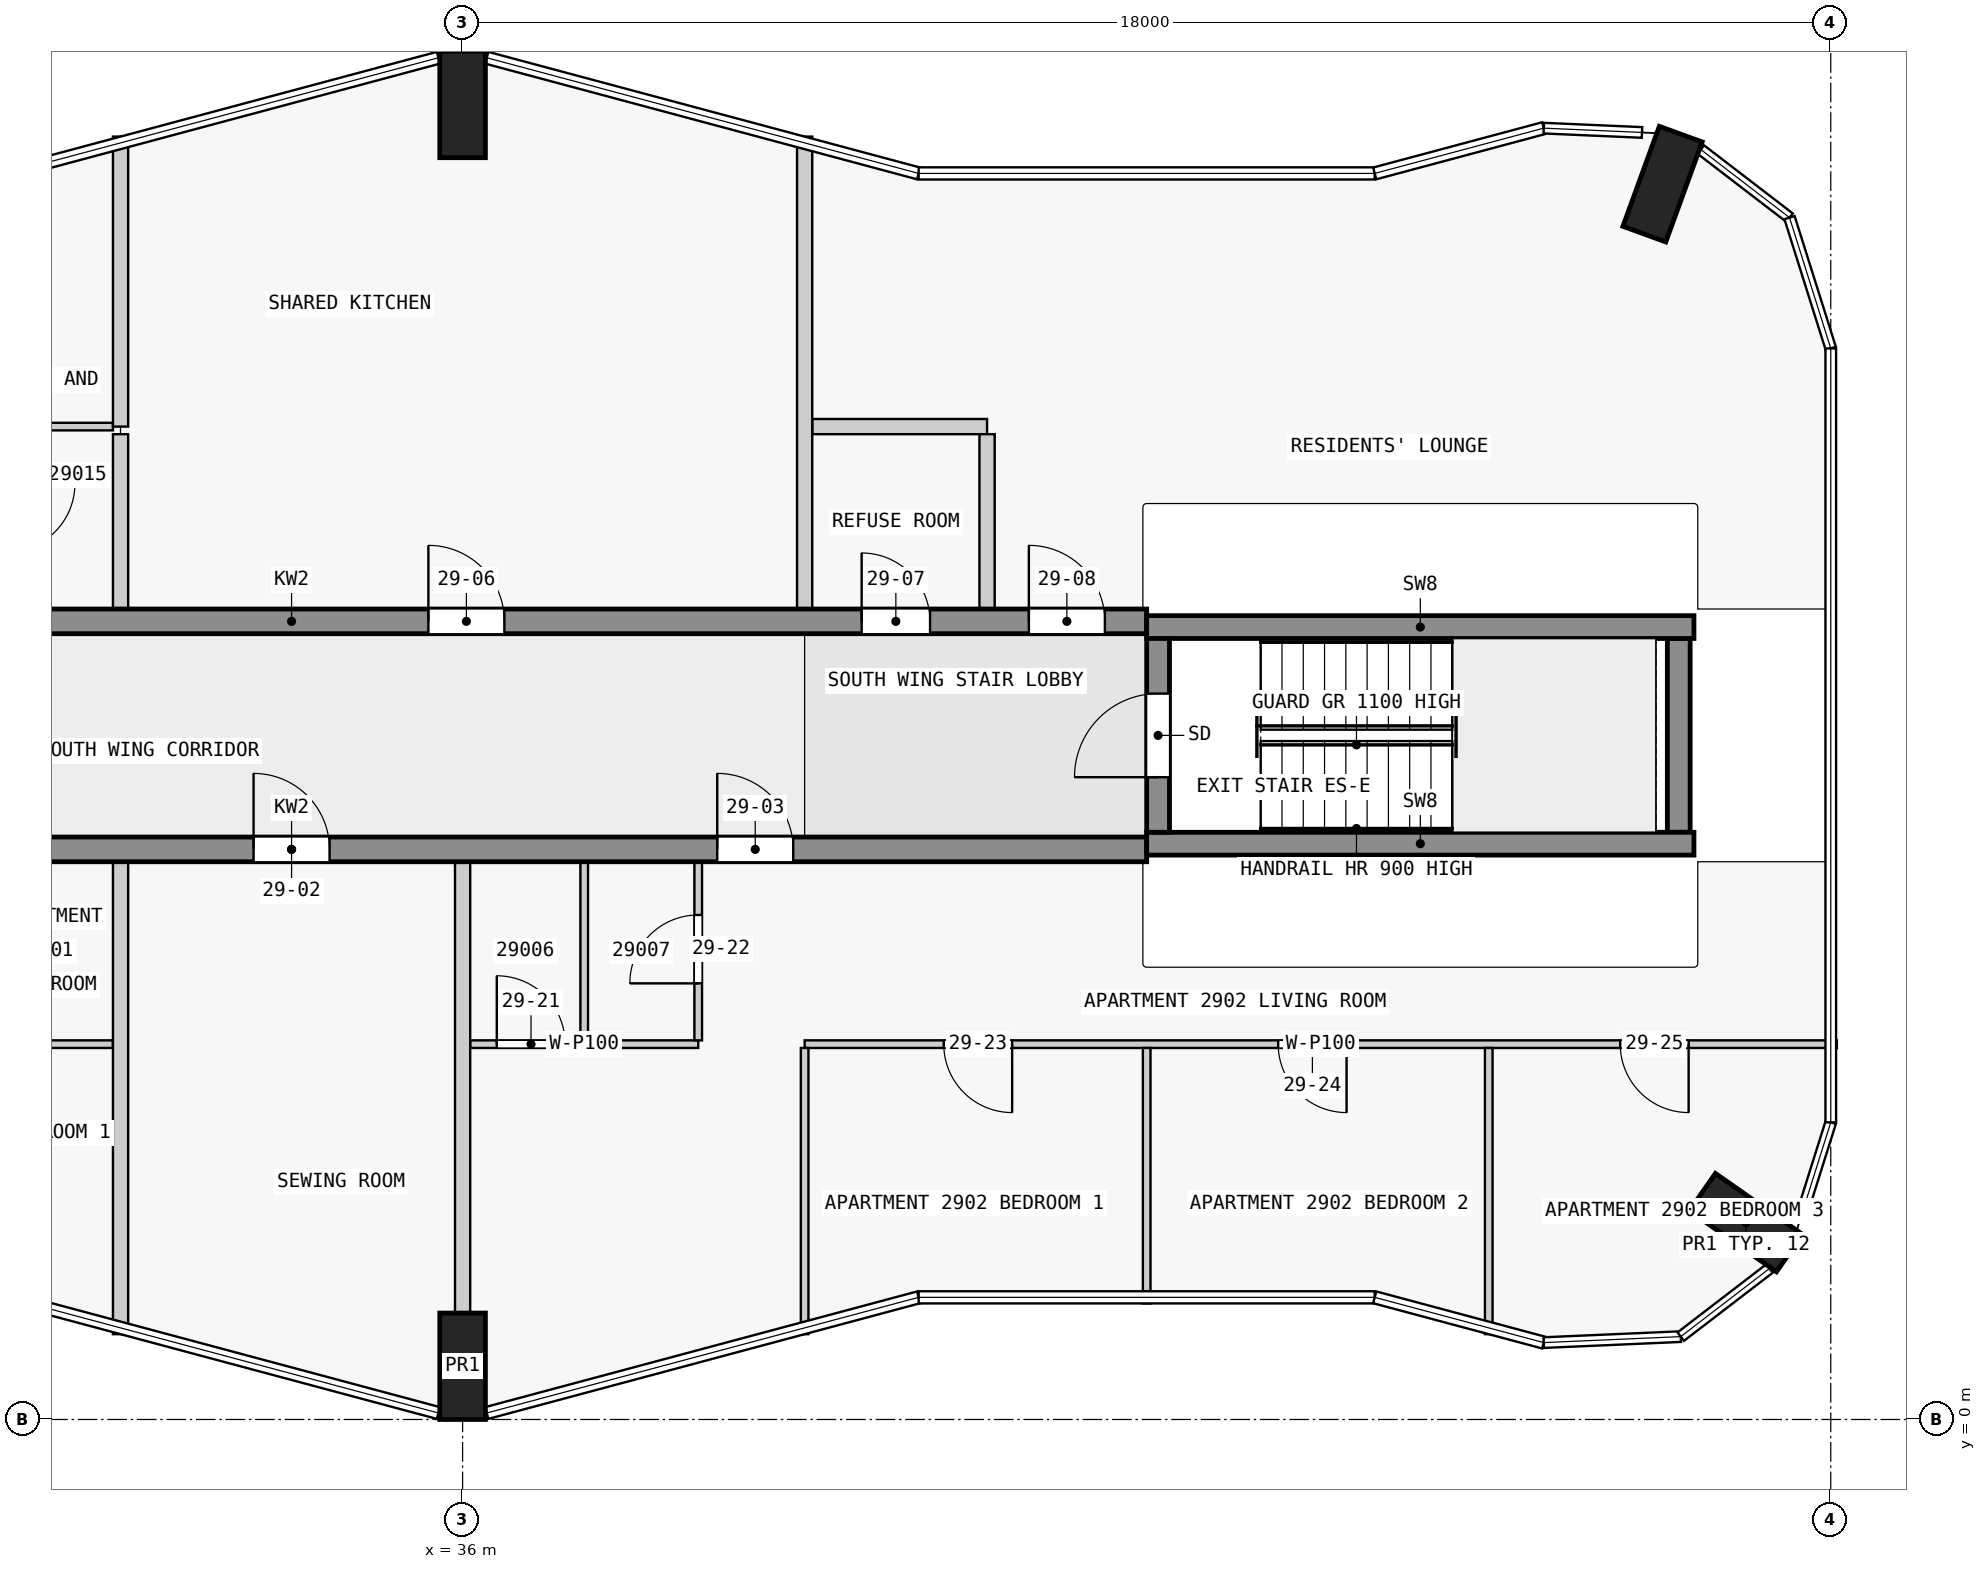
"""IFC4 building model, lengths in metres.
Left out: names, types, materials, properties, quantities, classifications, styles, units other than length and angle.
Written with IfcOpenShell. Run it as: python <this file> out.ifc"""

import sys

from ifc_helpers import new_model, si_unit, direction, frame, frame_2d, origin, origin_2d, place, context, subcontext, project, spatial, rectangle, extrude, element, fill, save


model = new_model("IFC4")
c1 = context("Model", 3, precision=1e-05, world=origin(), true_north=direction((0.0, 1.0)))
c2 = subcontext(c1, "Body", "Model", "MODEL_VIEW")
j1 = project(units=[si_unit("LENGTHUNIT", "METRE"), si_unit("PLANEANGLEUNIT", "RADIAN")], contexts=[c1])
p1 = place(None, origin())
s1 = spatial("IfcSite", under=j1, at=p1, CompositionType="ELEMENT")
p2 = place(p1, origin())
s2 = spatial("IfcBuilding", under=s1, at=p2, CompositionType="ELEMENT")
p3 = place(p2, frame((0.0, 0.0, 113.3)))
s3 = spatial("IfcBuildingStorey", under=s2, at=p3, CompositionType="ELEMENT", Elevation=113.3)
for number, where, z_axis, x_axis in (
    (1, (36.0, 0.7, 0.0), (0.0, 0.0, 1.0), (1.0, 0.0, 0.0)),
    (2, (52.884, 2.59, 0.0), (0.0, 0.0, 1.0), (0.574, 0.819, 0.0)),
    (3, (51.787, 16.252, 0.0), (0.0, 0.0, 1.0), (-0.94, 0.342, 0.0)),
    (4, (36.0, 17.3, 0.0), (0.0, 0.0, 1.0), (1.0, 0.0, 0.0)),
):
    element("IfcColumn", number, at=place(p3, frame(where, z_axis=z_axis, x_axis=x_axis)), inside=s3, PredefinedType="COLUMN", context=c2, shape_type="SweptSolid", body=[
        extrude(rectangle(XDim=0.6, YDim=1.4, at=origin_2d()), origin(), (0.0, 0.0, 1.0), 3.5),
    ])
p4 = place(p3, frame((45.15, 7.725, 0.0), z_axis=(0.0, 0.0, 1.0), x_axis=(0.0, 1.0, 0.0)))
e5 = element("IfcWall", 5, at=p4, inside=s3, PredefinedType="SHEAR", context=c2, shape_type="SweptSolid", body=[
    extrude(rectangle(XDim=2.55, YDim=0.3, at=frame_2d((1.275, 0.0))), origin(), (0.0, 0.0, 1.0), 3.5),
])
p5 = place(p4, frame((0.725, 0.0, 0.0)))
e6 = element("IfcOpeningElement", 6, at=p5, cuts=e5, PredefinedType="OPENING", context=c2, shape_type="SweptSolid", body=[
    extrude(rectangle(XDim=1.1, YDim=2.1, at=frame_2d((0.55, 1.05))), frame((0.0, 0.16, 0.0), z_axis=(0.0, -1.0, 0.0), x_axis=(1.0, 0.0, 0.0)), (0.0, 0.0, 1.0), 0.32),
])
p6 = place(p3, frame((52.0, 7.725, 0.0), z_axis=(0.0, 0.0, 1.0), x_axis=(0.0, 1.0, 0.0)))
e7 = element("IfcWall", 7, at=p6, inside=s3, PredefinedType="SHEAR", context=c2, shape_type="SweptSolid", body=[
    extrude(rectangle(XDim=2.55, YDim=0.3, at=frame_2d((1.275, 0.0))), origin(), (0.0, 0.0, 1.0), 3.5),
])
for number, where, z_axis, x_axis in (
    (8, (45.0, 7.575, 0.0), (0.0, 0.0, 1.0), (1.0, 0.0, 0.0)),
    (9, (45.0, 10.425, 0.0), (0.0, 0.0, 1.0), (1.0, 0.0, 0.0)),
):
    element("IfcWall", number, at=place(p3, frame(where, z_axis=z_axis, x_axis=x_axis)), inside=s3, PredefinedType="SHEAR", context=c2, shape_type="SweptSolid", body=[
        extrude(rectangle(XDim=7.2, YDim=0.3, at=frame_2d((3.6, 0.0))), origin(), (0.0, 0.0, 1.0), 3.5),
    ])
p7 = place(p3, frame((22.5, 7.5, 0.0), z_axis=(0.0, 0.0, 1.0), x_axis=(1.0, 0.0, 0.0)))
e10 = element("IfcWall", 10, at=p7, inside=s3, PredefinedType="SHEAR", context=c2, shape_type="SweptSolid", body=[
    extrude(rectangle(XDim=22.5, YDim=0.325, at=frame_2d((11.25, 0.0))), origin(), (0.0, 0.0, 1.0), 3.25),
])
p8 = place(p7, frame((4.05, 0.0, 0.0)))
e11 = element("IfcOpeningElement", 11, at=p8, cuts=e10, PredefinedType="OPENING", context=c2, shape_type="SweptSolid", body=[
    extrude(rectangle(XDim=1.0, YDim=2.1, at=frame_2d((0.5, 1.05))), frame((0.0, 0.172, 0.0), z_axis=(0.0, -1.0, 0.0), x_axis=(1.0, 0.0, 0.0)), (0.0, 0.0, 1.0), 0.345),
])
p9 = place(p7, frame((10.75, 0.0, 0.0)))
e12 = element("IfcOpeningElement", 12, at=p9, cuts=e10, PredefinedType="OPENING", context=c2, shape_type="SweptSolid", body=[
    extrude(rectangle(XDim=1.0, YDim=2.1, at=frame_2d((0.5, 1.05))), frame((0.0, 0.172, 0.0), z_axis=(0.0, -1.0, 0.0), x_axis=(1.0, 0.0, 0.0)), (0.0, 0.0, 1.0), 0.345),
])
p10 = place(p7, frame((16.85, 0.0, 0.0)))
e13 = element("IfcOpeningElement", 13, at=p10, cuts=e10, PredefinedType="OPENING", context=c2, shape_type="SweptSolid", body=[
    extrude(rectangle(XDim=1.0, YDim=2.1, at=frame_2d((0.5, 1.05))), frame((0.0, 0.172, 0.0), z_axis=(0.0, -1.0, 0.0), x_axis=(1.0, 0.0, 0.0)), (0.0, 0.0, 1.0), 0.345),
])
p11 = place(p3, frame((22.5, 10.5, 0.0), z_axis=(0.0, 0.0, 1.0), x_axis=(1.0, 0.0, 0.0)))
e14 = element("IfcWall", 14, at=p11, inside=s3, PredefinedType="SHEAR", context=c2, shape_type="SweptSolid", body=[
    extrude(rectangle(XDim=22.5, YDim=0.325, at=frame_2d((11.25, 0.0))), origin(), (0.0, 0.0, 1.0), 3.25),
])
p12 = place(p11, frame((1.85, 0.0, 0.0)))
e15 = element("IfcOpeningElement", 15, at=p12, cuts=e14, PredefinedType="OPENING", context=c2, shape_type="SweptSolid", body=[
    extrude(rectangle(XDim=0.9, YDim=2.1, at=frame_2d((0.45, 1.05))), frame((0.0, 0.172, 0.0), z_axis=(0.0, -1.0, 0.0), x_axis=(1.0, 0.0, 0.0)), (0.0, 0.0, 1.0), 0.345),
])
p13 = place(p11, frame((6.25, 0.0, 0.0)))
e16 = element("IfcOpeningElement", 16, at=p13, cuts=e14, PredefinedType="OPENING", context=c2, shape_type="SweptSolid", body=[
    extrude(rectangle(XDim=1.0, YDim=2.1, at=frame_2d((0.5, 1.05))), frame((0.0, 0.172, 0.0), z_axis=(0.0, -1.0, 0.0), x_axis=(1.0, 0.0, 0.0)), (0.0, 0.0, 1.0), 0.345),
])
p14 = place(p11, frame((13.05, 0.0, 0.0)))
e17 = element("IfcOpeningElement", 17, at=p14, cuts=e14, PredefinedType="OPENING", context=c2, shape_type="SweptSolid", body=[
    extrude(rectangle(XDim=1.0, YDim=2.1, at=frame_2d((0.5, 1.05))), frame((0.0, 0.172, 0.0), z_axis=(0.0, -1.0, 0.0), x_axis=(1.0, 0.0, 0.0)), (0.0, 0.0, 1.0), 0.345),
])
p15 = place(p11, frame((18.75, 0.0, 0.0)))
e18 = element("IfcOpeningElement", 18, at=p15, cuts=e14, PredefinedType="OPENING", context=c2, shape_type="SweptSolid", body=[
    extrude(rectangle(XDim=0.9, YDim=2.1, at=frame_2d((0.45, 1.05))), frame((0.0, 0.172, 0.0), z_axis=(0.0, -1.0, 0.0), x_axis=(1.0, 0.0, 0.0)), (0.0, 0.0, 1.0), 0.345),
])
p16 = place(p11, frame((20.95, 0.0, 0.0)))
e19 = element("IfcOpeningElement", 19, at=p16, cuts=e14, PredefinedType="OPENING", context=c2, shape_type="SweptSolid", body=[
    extrude(rectangle(XDim=1.0, YDim=2.1, at=frame_2d((0.5, 1.05))), frame((0.0, 0.172, 0.0), z_axis=(0.0, -1.0, 0.0), x_axis=(1.0, 0.0, 0.0)), (0.0, 0.0, 1.0), 0.345),
])
p17 = place(p3, frame((54.08, 4.938, 0.0), z_axis=(0.0, 0.0, 1.0), x_axis=(-1.0, 0.0, 0.0)))
e20 = element("IfcWall", 20, at=p17, inside=s3, PredefinedType="PARTITIONING", context=c2, shape_type="SweptSolid", body=[
    extrude(rectangle(XDim=13.58, YDim=0.1, at=frame_2d((6.79, 0.0))), origin(), (0.0, 0.0, 1.0), 3.25),
])
p18 = place(p17, frame((10.85, 0.0, 0.0)))
e21 = element("IfcOpeningElement", 21, at=p18, cuts=e20, PredefinedType="OPENING", context=c2, shape_type="SweptSolid", body=[
    extrude(rectangle(XDim=0.9, YDim=2.1, at=frame_2d((0.45, 1.05))), frame((0.0, 0.06, 0.0), z_axis=(0.0, -1.0, 0.0), x_axis=(1.0, 0.0, 0.0)), (0.0, 0.0, 1.0), 0.12),
])
p19 = place(p17, frame((6.45, 0.0, 0.0)))
e22 = element("IfcOpeningElement", 22, at=p19, cuts=e20, PredefinedType="OPENING", context=c2, shape_type="SweptSolid", body=[
    extrude(rectangle(XDim=0.9, YDim=2.1, at=frame_2d((0.45, 1.05))), frame((0.0, 0.06, 0.0), z_axis=(0.0, -1.0, 0.0), x_axis=(1.0, 0.0, 0.0)), (0.0, 0.0, 1.0), 0.12),
])
p20 = place(p17, frame((1.95, 0.0, 0.0)))
e23 = element("IfcOpeningElement", 23, at=p20, cuts=e20, PredefinedType="OPENING", context=c2, shape_type="SweptSolid", body=[
    extrude(rectangle(XDim=0.9, YDim=2.1, at=frame_2d((0.45, 1.05))), frame((0.0, 0.06, 0.0), z_axis=(0.0, -1.0, 0.0), x_axis=(1.0, 0.0, 0.0)), (0.0, 0.0, 1.0), 0.12),
])
p21 = place(p3, frame((29.75, 4.938, 0.0), z_axis=(0.0, 0.0, 1.0), x_axis=(1.0, 0.0, 0.0)))
e24 = element("IfcWall", 24, at=p21, inside=s3, PredefinedType="PARTITIONING", context=c2, shape_type="SweptSolid", body=[
    extrude(rectangle(XDim=1.65, YDim=0.1, at=frame_2d((0.825, 0.0))), origin(), (0.0, 0.0, 1.0), 3.25),
])
p22 = place(p3, frame((36.1, 4.938, 0.0), z_axis=(0.0, 0.0, 1.0), x_axis=(1.0, 0.0, 0.0)))
e25 = element("IfcWall", 25, at=p22, inside=s3, PredefinedType="PARTITIONING", context=c2, shape_type="SweptSolid", body=[
    extrude(rectangle(XDim=3.0, YDim=0.1, at=frame_2d((1.5, 0.0))), origin(), (0.0, 0.0, 1.0), 3.25),
])
p23 = place(p22, frame((0.35, 0.0, 0.0)))
e26 = element("IfcOpeningElement", 26, at=p23, cuts=e25, PredefinedType="OPENING", context=c2, shape_type="SweptSolid", body=[
    extrude(rectangle(XDim=0.9, YDim=2.1, at=frame_2d((0.45, 1.05))), frame((0.0, 0.06, 0.0), z_axis=(0.0, -1.0, 0.0), x_axis=(1.0, 0.0, 0.0)), (0.0, 0.0, 1.0), 0.12),
])
p24 = place(p3, frame((31.4, 13.062, 0.0), z_axis=(0.0, 0.0, 1.0), x_axis=(-1.0, 0.0, 0.0)))
e27 = element("IfcWall", 27, at=p24, inside=s3, PredefinedType="PARTITIONING", context=c2, shape_type="SweptSolid", body=[
    extrude(rectangle(XDim=1.35, YDim=0.1, at=frame_2d((0.675, 0.0))), origin(), (0.0, 0.0, 1.0), 3.25),
])
p25 = place(p3, frame((42.9, 13.062, 0.0), z_axis=(0.0, 0.0, 1.0), x_axis=(-1.0, 0.0, 0.0)))
e28 = element("IfcWall", 28, at=p25, inside=s3, PredefinedType="PARTITIONING", context=c2, shape_type="SweptSolid", body=[
    extrude(rectangle(XDim=2.3, YDim=0.2, at=frame_2d((1.15, 0.0))), origin(), (0.0, 0.0, 1.0), 3.25),
])
p26 = place(p3, frame((31.5, 16.878, 0.0), z_axis=(0.0, 0.0, 1.0), x_axis=(0.0, -1.0, 0.0)))
e29 = element("IfcWall", 29, at=p26, inside=s3, PredefinedType="PARTITIONING", context=c2, shape_type="SweptSolid", body=[
    extrude(rectangle(XDim=3.815, YDim=0.2, at=frame_2d((1.908, 0.0))), origin(), (0.0, 0.0, 1.0), 3.25),
])
p27 = place(p3, frame((31.5, 1.122, 0.0), z_axis=(0.0, 0.0, 1.0), x_axis=(0.0, 1.0, 0.0)))
e30 = element("IfcWall", 30, at=p27, inside=s3, PredefinedType="PARTITIONING", context=c2, shape_type="SweptSolid", body=[
    extrude(rectangle(XDim=6.215, YDim=0.2, at=frame_2d((3.107, 0.0))), origin(), (0.0, 0.0, 1.0), 3.25),
])
p28 = place(p3, frame((31.5, 10.663, 0.0), z_axis=(0.0, 0.0, 1.0), x_axis=(0.0, 1.0, 0.0)))
e31 = element("IfcWall", 31, at=p28, inside=s3, PredefinedType="PARTITIONING", context=c2, shape_type="SweptSolid", body=[
    extrude(rectangle(XDim=2.3, YDim=0.2, at=frame_2d((1.15, 0.0))), origin(), (0.0, 0.0, 1.0), 3.25),
])
p29 = place(p3, frame((36.0, 1.4, 0.0), z_axis=(0.0, 0.0, 1.0), x_axis=(0.0, 1.0, 0.0)))
e32 = element("IfcWall", 32, at=p29, inside=s3, PredefinedType="PARTITIONING", context=c2, shape_type="SweptSolid", body=[
    extrude(rectangle(XDim=5.938, YDim=0.2, at=frame_2d((2.969, 0.0))), origin(), (0.0, 0.0, 1.0), 3.25),
])
p30 = place(p3, frame((37.6, 4.988, 0.0), z_axis=(0.0, 0.0, 1.0), x_axis=(0.0, 1.0, 0.0)))
e33 = element("IfcWall", 33, at=p30, inside=s3, PredefinedType="PARTITIONING", context=c2, shape_type="SweptSolid", body=[
    extrude(rectangle(XDim=2.35, YDim=0.1, at=frame_2d((1.175, 0.0))), origin(), (0.0, 0.0, 1.0), 3.25),
])
p31 = place(p3, frame((39.1, 4.988, 0.0), z_axis=(0.0, 0.0, 1.0), x_axis=(0.0, 1.0, 0.0)))
e34 = element("IfcWall", 34, at=p31, inside=s3, PredefinedType="PARTITIONING", context=c2, shape_type="SweptSolid", body=[
    extrude(rectangle(XDim=2.35, YDim=0.1, at=frame_2d((1.175, 0.0))), origin(), (0.0, 0.0, 1.0), 3.25),
])
p32 = place(p31, frame((0.75, 0.0, 0.0)))
e35 = element("IfcOpeningElement", 35, at=p32, cuts=e34, PredefinedType="OPENING", context=c2, shape_type="SweptSolid", body=[
    extrude(rectangle(XDim=0.9, YDim=2.1, at=frame_2d((0.45, 1.05))), frame((0.0, 0.06, 0.0), z_axis=(0.0, -1.0, 0.0), x_axis=(1.0, 0.0, 0.0)), (0.0, 0.0, 1.0), 0.12),
])
p33 = place(p3, frame((40.5, 4.887, 0.0), z_axis=(0.0, 0.0, 1.0), x_axis=(0.0, -1.0, 0.0)))
e36 = element("IfcWall", 36, at=p33, inside=s3, PredefinedType="PARTITIONING", context=c2, shape_type="SweptSolid", body=[
    extrude(rectangle(XDim=3.765, YDim=0.1, at=frame_2d((1.883, 0.0))), origin(), (0.0, 0.0, 1.0), 3.25),
])
p34 = place(p3, frame((40.5, 10.663, 0.0), z_axis=(0.0, 0.0, 1.0), x_axis=(0.0, 1.0, 0.0)))
e37 = element("IfcWall", 37, at=p34, inside=s3, PredefinedType="PARTITIONING", context=c2, shape_type="SweptSolid", body=[
    extrude(rectangle(XDim=6.215, YDim=0.2, at=frame_2d((3.107, 0.0))), origin(), (0.0, 0.0, 1.0), 3.25),
])
p35 = place(p3, frame((42.9, 10.663, 0.0), z_axis=(0.0, 0.0, 1.0), x_axis=(0.0, 1.0, 0.0)))
e38 = element("IfcWall", 38, at=p35, inside=s3, PredefinedType="PARTITIONING", context=c2, shape_type="SweptSolid", body=[
    extrude(rectangle(XDim=2.3, YDim=0.2, at=frame_2d((1.15, 0.0))), origin(), (0.0, 0.0, 1.0), 3.25),
])
p36 = place(p3, frame((45.0, 1.527, 0.0), z_axis=(0.0, 0.0, 1.0), x_axis=(0.0, 1.0, 0.0)))
e39 = element("IfcWall", 39, at=p36, inside=s3, PredefinedType="PARTITIONING", context=c2, shape_type="SweptSolid", body=[
    extrude(rectangle(XDim=3.361, YDim=0.1, at=frame_2d((1.68, 0.0))), origin(), (0.0, 0.0, 1.0), 3.25),
])
p37 = place(p3, frame((49.5, 1.122, 0.0), z_axis=(0.0, 0.0, 1.0), x_axis=(0.0, 1.0, 0.0)))
e40 = element("IfcWall", 40, at=p37, inside=s3, PredefinedType="PARTITIONING", context=c2, shape_type="SweptSolid", body=[
    extrude(rectangle(XDim=3.765, YDim=0.1, at=frame_2d((1.883, 0.0))), origin(), (0.0, 0.0, 1.0), 3.25),
])
p38 = place(p5, origin())
e41 = element("IfcDoor", 41, at=p38, inside=s3, OperationType="SINGLE_SWING_LEFT", PredefinedType="DOOR", context=c2, shape_type="SweptSolid", body=[
    extrude(rectangle(XDim=1.1, YDim=2.1, at=frame_2d((0.55, 1.05))), frame((0.0, 0.025, 0.0), z_axis=(0.0, -1.0, 0.0), x_axis=(1.0, 0.0, 0.0)), (0.0, 0.0, 1.0), 0.05),
])
fill(e6, e41)
p39 = place(p9, origin())
e42 = element("IfcDoor", 42, at=p39, inside=s3, OperationType="SINGLE_SWING_LEFT", PredefinedType="DOOR", context=c2, shape_type="SweptSolid", body=[
    extrude(rectangle(XDim=1.0, YDim=2.1, at=frame_2d((0.5, 1.05))), frame((0.0, 0.025, 0.0), z_axis=(0.0, -1.0, 0.0), x_axis=(1.0, 0.0, 0.0)), (0.0, 0.0, 1.0), 0.05),
])
fill(e12, e42)
p40 = place(p10, origin())
e43 = element("IfcDoor", 43, at=p40, inside=s3, OperationType="SINGLE_SWING_RIGHT", PredefinedType="DOOR", context=c2, shape_type="SweptSolid", body=[
    extrude(rectangle(XDim=1.0, YDim=2.1, at=frame_2d((0.5, 1.05))), frame((0.0, 0.025, 0.0), z_axis=(0.0, -1.0, 0.0), x_axis=(1.0, 0.0, 0.0)), (0.0, 0.0, 1.0), 0.05),
])
fill(e13, e43)
p41 = place(p14, origin())
e44 = element("IfcDoor", 44, at=p41, inside=s3, OperationType="SINGLE_SWING_RIGHT", PredefinedType="DOOR", context=c2, shape_type="SweptSolid", body=[
    extrude(rectangle(XDim=1.0, YDim=2.1, at=frame_2d((0.5, 1.05))), frame((0.0, 0.025, 0.0), z_axis=(0.0, -1.0, 0.0), x_axis=(1.0, 0.0, 0.0)), (0.0, 0.0, 1.0), 0.05),
])
fill(e17, e44)
p42 = place(p15, origin())
e45 = element("IfcDoor", 45, at=p42, inside=s3, OperationType="SINGLE_SWING_RIGHT", PredefinedType="DOOR", context=c2, shape_type="SweptSolid", body=[
    extrude(rectangle(XDim=0.9, YDim=2.1, at=frame_2d((0.45, 1.05))), frame((0.0, 0.025, 0.0), z_axis=(0.0, -1.0, 0.0), x_axis=(1.0, 0.0, 0.0)), (0.0, 0.0, 1.0), 0.05),
])
fill(e18, e45)
p43 = place(p16, origin())
e46 = element("IfcDoor", 46, at=p43, inside=s3, OperationType="SINGLE_SWING_RIGHT", PredefinedType="DOOR", context=c2, shape_type="SweptSolid", body=[
    extrude(rectangle(XDim=1.0, YDim=2.1, at=frame_2d((0.5, 1.05))), frame((0.0, 0.025, 0.0), z_axis=(0.0, -1.0, 0.0), x_axis=(1.0, 0.0, 0.0)), (0.0, 0.0, 1.0), 0.05),
])
fill(e19, e46)
p44 = place(p23, origin())
e47 = element("IfcDoor", 47, at=p44, inside=s3, OperationType="SINGLE_SWING_LEFT", PredefinedType="DOOR", context=c2, shape_type="SweptSolid", body=[
    extrude(rectangle(XDim=0.9, YDim=2.1, at=frame_2d((0.45, 1.05))), frame((0.0, 0.025, 0.0), z_axis=(0.0, -1.0, 0.0), x_axis=(1.0, 0.0, 0.0)), (0.0, 0.0, 1.0), 0.05),
])
fill(e26, e47)
p45 = place(p32, origin())
e48 = element("IfcDoor", 48, at=p45, inside=s3, OperationType="SINGLE_SWING_RIGHT", PredefinedType="DOOR", context=c2, shape_type="SweptSolid", body=[
    extrude(rectangle(XDim=0.9, YDim=2.1, at=frame_2d((0.45, 1.05))), frame((0.0, 0.025, 0.0), z_axis=(0.0, -1.0, 0.0), x_axis=(1.0, 0.0, 0.0)), (0.0, 0.0, 1.0), 0.05),
])
fill(e35, e48)
p46 = place(p18, origin())
e49 = element("IfcDoor", 49, at=p46, inside=s3, OperationType="SINGLE_SWING_RIGHT", PredefinedType="DOOR", context=c2, shape_type="SweptSolid", body=[
    extrude(rectangle(XDim=0.9, YDim=2.1, at=frame_2d((0.45, 1.05))), frame((0.0, 0.025, 0.0), z_axis=(0.0, -1.0, 0.0), x_axis=(1.0, 0.0, 0.0)), (0.0, 0.0, 1.0), 0.05),
])
fill(e21, e49)
p47 = place(p19, origin())
e50 = element("IfcDoor", 50, at=p47, inside=s3, OperationType="SINGLE_SWING_RIGHT", PredefinedType="DOOR", context=c2, shape_type="SweptSolid", body=[
    extrude(rectangle(XDim=0.9, YDim=2.1, at=frame_2d((0.45, 1.05))), frame((0.0, 0.025, 0.0), z_axis=(0.0, -1.0, 0.0), x_axis=(1.0, 0.0, 0.0)), (0.0, 0.0, 1.0), 0.05),
])
fill(e22, e50)
p48 = place(p20, origin())
e51 = element("IfcDoor", 51, at=p48, inside=s3, OperationType="SINGLE_SWING_LEFT", PredefinedType="DOOR", context=c2, shape_type="SweptSolid", body=[
    extrude(rectangle(XDim=0.9, YDim=2.1, at=frame_2d((0.45, 1.05))), frame((0.0, 0.025, 0.0), z_axis=(0.0, -1.0, 0.0), x_axis=(1.0, 0.0, 0.0)), (0.0, 0.0, 1.0), 0.05),
])
fill(e23, e51)
save(model, sys.argv[1])
